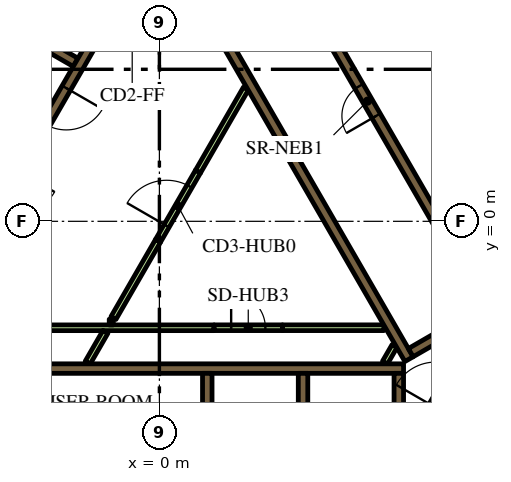
"""IFC4 building model, lengths in metres.
Left out: names, types, materials, properties, quantities, classifications, styles, units other than length and angle.
Written with IfcOpenShell. Run it as: python <this file> out.ifc"""

import sys

from ifc_helpers import new_model, si_unit, direction, frame, frame_2d, origin, place, context, subcontext, project, spatial, polyline, rectangle, outline, extrude, element, fill, save


model = new_model("IFC4")
c1 = context("Model", 3, precision=1e-05, world=origin(), true_north=direction((0.0, 1.0)))
c2 = subcontext(c1, "Body", "Model", "MODEL_VIEW")
j1 = project(units=[si_unit("LENGTHUNIT", "METRE"), si_unit("PLANEANGLEUNIT", "RADIAN")], contexts=[c1])
p1 = place(None, origin())
s1 = spatial("IfcSite", under=j1, at=p1, CompositionType="ELEMENT")
p2 = place(p1, origin())
s2 = spatial("IfcBuilding", under=s1, at=p2, CompositionType="ELEMENT")
p3 = place(p2, frame((0.0, 0.0, 62.7)))
s3 = spatial("IfcBuildingStorey", under=s2, at=p3, CompositionType="ELEMENT", Elevation=62.7)
p4 = place(p3, frame((6.776, 13.364, 0.0), z_axis=(0.0, 0.0, 1.0), x_axis=(0.500004177138, -0.8660229921, 0.0)))
e1 = element("IfcWall", 1, at=p4, inside=s3, PredefinedType="SOLIDWALL", context=c2, shape_type="SweptSolid", body=[
    extrude(rectangle(XDim=20.204, YDim=0.9, at=frame_2d((10.102, 0.0))), origin(), (0.0, 0.0, 1.0), 3.9),
])
p5 = place(p3, frame((-6.19, -3.875, 0.0), z_axis=(0.0, 0.0, 1.0), x_axis=(1.0, 0.0, 0.0)))
e2 = element("IfcWall", 2, at=p5, inside=s3, PredefinedType="SOLIDWALL", context=c2, shape_type="SweptSolid", body=[
    extrude(rectangle(XDim=12.615, YDim=0.25, at=frame_2d((6.307, 0.0))), origin(), (0.0, 0.0, 1.0), 3.9),
])
p6 = place(p3, frame((6.3, -7.268, 0.0), z_axis=(0.0, 0.0, 1.0), x_axis=(0.0, 1.0, 0.0)))
e3 = element("IfcWall", 3, at=p6, inside=s3, PredefinedType="SOLIDWALL", context=c2, shape_type="SweptSolid", body=[
    extrude(rectangle(XDim=3.268, YDim=0.25, at=frame_2d((1.634, 0.0))), origin(), (0.0, 0.0, 1.0), 3.9),
])
for number, where, z_axis, x_axis in (
    (4, (3.78, -4.0, 0.0), (0.0, 0.0, 1.0), (0.0, -1.0, 0.0)),
    (5, (1.26, -4.0, 0.0), (0.0, 0.0, 1.0), (0.0, -1.0, 0.0)),
):
    element("IfcWall", number, at=place(p3, frame(where, z_axis=z_axis, x_axis=x_axis)), inside=s3, PredefinedType="SOLIDWALL", context=c2, shape_type="SweptSolid", body=[
        extrude(rectangle(XDim=2.2, YDim=0.25, at=frame_2d((1.1, 0.0))), origin(), (0.0, 0.0, 1.0), 3.9),
    ])
p7 = place(p3, origin())
e6 = element("IfcWall", 6, at=p7, inside=s3, PredefinedType="SOLIDWALL", context=c2, shape_type="SweptSolid", body=[
    extrude(outline(polyline([(0.335, 6.925), (0.335, 6.925), (0.335, 7.075), (0.335, 7.075), (0.335, 7.075), (0.245, 7.075), (0.079, 7.363), (0.035, 7.439), (0.252, 7.564), (0.377, 7.348), (6.552, -3.348), (6.677, -3.564), (6.46, -3.689), (4.897, -0.981), (0.332, 6.925), (0.335, 6.925), (0.335, 6.925)])), origin(), (0.0, 0.0, 1.0), 3.9),
])
p8 = place(p3, frame((9.352, -1.875, 0.0), z_axis=(0.0, 0.0, 1.0), x_axis=(-0.866024844342, -0.500000968981, 0.0)))
e7 = element("IfcWall", 7, at=p8, inside=s3, PredefinedType="SOLIDWALL", context=c2, shape_type="SweptSolid", body=[
    extrude(rectangle(XDim=3.162, YDim=0.25, at=frame_2d((1.581, 0.0))), origin(), (0.0, 0.0, 1.0), 3.9),
])
p9 = place(p3, frame((-8.06, -1.311, 0.0), z_axis=(0.0, 0.0, 1.0), x_axis=(0.50000273126, 0.866023826885, 0.0)))
e8 = element("IfcWall", 8, at=p9, inside=s3, PredefinedType="SOLIDWALL", context=c2, shape_type="SweptSolid", body=[
    extrude(rectangle(XDim=10.33, YDim=0.25, at=frame_2d((5.165, 0.0))), origin(), (0.0, 0.0, 1.0), 3.9),
])
p10 = place(p3, frame((-2.204, 4.182, 0.0), z_axis=(0.0, 0.0, 1.0), x_axis=(-0.866008176907, 0.50002983664, 0.0)))
e9 = element("IfcWall", 9, at=p10, inside=s3, PredefinedType="SOLIDWALL", context=c2, shape_type="SweptSolid", body=[
    extrude(rectangle(XDim=2.2, YDim=0.25, at=frame_2d((1.1, 0.0))), origin(), (0.0, 0.0, 1.0), 3.9),
])
p11 = place(p3, frame((-6.086, -2.801, 0.0), z_axis=(0.0, 0.0, 1.0), x_axis=(1.0, 0.0, 0.0)))
e10 = element("IfcWall", 10, at=p11, inside=s3, PredefinedType="PARTITIONING", context=c2, shape_type="SweptSolid", body=[
    extrude(rectangle(XDim=7.524, YDim=0.15, at=frame_2d((3.762, 0.0))), origin(), (0.0, 0.0, 1.0), 2.75),
])
p12 = place(p3, frame((-1.887, -3.718, 0.0), z_axis=(0.0, 0.0, 1.0), x_axis=(0.499842898591, 0.866116087328, 0.0)))
e11 = element("IfcWall", 11, at=p12, inside=s3, PredefinedType="PARTITIONING", context=c2, shape_type="SweptSolid", body=[
    extrude(rectangle(XDim=0.936, YDim=0.15, at=frame_2d((0.468, 0.0))), origin(), (0.0, 0.0, 1.0), 2.75),
])
p13 = place(p3, frame((-1.212, -2.651, 0.0), z_axis=(0.0, 0.0, 1.0), x_axis=(-1.0, 0.0, 0.0)))
e12 = element("IfcWall", 12, at=p13, inside=s3, PredefinedType="PARTITIONING", context=c2, shape_type="SweptSolid", body=[
    extrude(rectangle(XDim=0.108, YDim=0.15, at=frame_2d((0.054, 0.0))), origin(), (0.0, 0.0, 1.0), 2.75),
])
p14 = place(p3, frame((-1.208, -2.544, 0.0), z_axis=(0.0, 0.0, 1.0), x_axis=(0.499995339376, 0.86602809458, 0.0)))
e13 = element("IfcWall", 13, at=p14, inside=s3, PredefinedType="PARTITIONING", context=c2, shape_type="SweptSolid", body=[
    extrude(rectangle(XDim=2.349, YDim=0.15, at=frame_2d((1.175, 0.0))), origin(), (0.0, 0.0, 1.0), 2.75),
])
p15 = place(p3, frame((5.936, -3.718, 0.0), z_axis=(0.0, 0.0, 1.0), x_axis=(0.499890179513, 0.866088799389, 0.0)))
e14 = element("IfcWall", 14, at=p15, inside=s3, PredefinedType="PARTITIONING", context=c2, shape_type="SweptSolid", body=[
    extrude(rectangle(XDim=0.504, YDim=0.15, at=frame_2d((0.252, 0.0))), origin(), (0.0, 0.0, 1.0), 2.75),
])
p16 = place(p3, frame((3.238, -2.8, 0.0), z_axis=(0.0, 0.0, 1.0), x_axis=(1.0, 0.0, 0.0)))
e15 = element("IfcWall", 15, at=p16, inside=s3, PredefinedType="PARTITIONING", context=c2, shape_type="SweptSolid", body=[
    extrude(rectangle(XDim=2.672, YDim=0.15, at=frame_2d((1.336, 0.0))), origin(), (0.0, 0.0, 1.0), 2.75),
])
p17 = place(p3, frame((1.016, 1.309, 0.0), z_axis=(0.0, 0.0, 1.0), x_axis=(0.49998231768, 0.866035612436, 0.0)))
e16 = element("IfcWall", 16, at=p17, inside=s3, PredefinedType="PARTITIONING", context=c2, shape_type="SweptSolid", body=[
    extrude(rectangle(XDim=2.521, YDim=0.15, at=frame_2d((1.26, 0.0))), origin(), (0.0, 0.0, 1.0), 2.75),
])
p18 = place(p3, frame((11.553, -0.46, 0.0), z_axis=(0.0, 0.0, 1.0), x_axis=(-0.500006514828, 0.866021642414, 0.0)))
e17 = element("IfcWall", 17, at=p18, inside=s3, PredefinedType="SOLIDWALL", context=c2, shape_type="SweptSolid", body=[
    extrude(rectangle(XDim=12.35, YDim=0.25, at=frame_2d((6.175, 0.0))), origin(), (0.0, 0.0, 1.0), 3.9),
])
p19 = place(p18, frame((0.585, 0.0, 0.0)))
e18 = element("IfcOpeningElement", 18, at=p19, cuts=e17, PredefinedType="OPENING", context=c2, shape_type="SweptSolid", body=[
    extrude(rectangle(XDim=1.1, YDim=2.1, at=frame_2d((0.55, 1.05))), frame((0.0, 0.135, 0.0), z_axis=(0.0, -1.0, 0.0), x_axis=(1.0, 0.0, 0.0)), (0.0, 0.0, 1.0), 0.27),
])
p20 = place(p18, frame((3.105, 0.0, 0.0)))
e19 = element("IfcOpeningElement", 19, at=p20, cuts=e17, PredefinedType="OPENING", context=c2, shape_type="SweptSolid", body=[
    extrude(rectangle(XDim=1.1, YDim=2.1, at=frame_2d((0.55, 1.05))), frame((0.0, 0.135, 0.0), z_axis=(0.0, -1.0, 0.0), x_axis=(1.0, 0.0, 0.0)), (0.0, 0.0, 1.0), 0.27),
])
p21 = place(p18, frame((5.625, 0.0, 0.0)))
e20 = element("IfcOpeningElement", 20, at=p21, cuts=e17, PredefinedType="OPENING", context=c2, shape_type="SweptSolid", body=[
    extrude(rectangle(XDim=1.1, YDim=2.1, at=frame_2d((0.55, 1.05))), frame((0.0, 0.135, 0.0), z_axis=(0.0, -1.0, 0.0), x_axis=(1.0, 0.0, 0.0)), (0.0, 0.0, 1.0), 0.27),
])
p22 = place(p3, frame((8.565, -2.185, 0.0), z_axis=(0.0, 0.0, 1.0), x_axis=(-0.499997954832, 0.866026584559, 0.0)))
e21 = element("IfcWall", 21, at=p22, inside=s3, PredefinedType="SOLIDWALL", context=c2, shape_type="SweptSolid", body=[
    extrude(rectangle(XDim=12.35, YDim=0.25, at=frame_2d((6.175, 0.0))), origin(), (0.0, 0.0, 1.0), 3.9),
])
p23 = place(p22, frame((5.725, 0.0, 0.0)))
e22 = element("IfcOpeningElement", 22, at=p23, cuts=e21, PredefinedType="OPENING", context=c2, shape_type="SweptSolid", body=[
    extrude(rectangle(XDim=0.9, YDim=2.1, at=frame_2d((0.45, 1.05))), frame((0.0, 0.135, 0.0), z_axis=(0.0, -1.0, 0.0), x_axis=(1.0, 0.0, 0.0)), (0.0, 0.0, 1.0), 0.27),
])
p24 = place(p3, frame((-0.898, 6.194, 0.0), z_axis=(0.0, 0.0, 1.0), x_axis=(-0.499996202215, -0.866027596426, 0.0)))
e23 = element("IfcWall", 23, at=p24, inside=s3, PredefinedType="SOLIDWALL", context=c2, shape_type="SweptSolid", body=[
    extrude(rectangle(XDim=9.83, YDim=0.25, at=frame_2d((4.915, 0.0))), origin(), (0.0, 0.0, 1.0), 3.9),
])
p25 = place(p24, frame((0.585, 0.0, 0.0)))
e24 = element("IfcOpeningElement", 24, at=p25, cuts=e23, PredefinedType="OPENING", context=c2, shape_type="SweptSolid", body=[
    extrude(rectangle(XDim=1.1, YDim=2.1, at=frame_2d((0.55, 1.05))), frame((0.0, 0.135, 0.0), z_axis=(0.0, -1.0, 0.0), x_axis=(1.0, 0.0, 0.0)), (0.0, 0.0, 1.0), 0.27),
])
p26 = place(p24, frame((3.105, 0.0, 0.0)))
e25 = element("IfcOpeningElement", 25, at=p26, cuts=e23, PredefinedType="OPENING", context=c2, shape_type="SweptSolid", body=[
    extrude(rectangle(XDim=1.1, YDim=2.1, at=frame_2d((0.55, 1.05))), frame((0.0, 0.135, 0.0), z_axis=(0.0, -1.0, 0.0), x_axis=(1.0, 0.0, 0.0)), (0.0, 0.0, 1.0), 0.27),
])
p27 = place(p24, frame((5.625, 0.0, 0.0)))
e26 = element("IfcOpeningElement", 26, at=p27, cuts=e23, PredefinedType="OPENING", context=c2, shape_type="SweptSolid", body=[
    extrude(rectangle(XDim=1.1, YDim=2.1, at=frame_2d((0.55, 1.05))), frame((0.0, 0.135, 0.0), z_axis=(0.0, -1.0, 0.0), x_axis=(1.0, 0.0, 0.0)), (0.0, 0.0, 1.0), 0.27),
])
p28 = place(p24, frame((8.145, 0.0, 0.0)))
e27 = element("IfcOpeningElement", 27, at=p28, cuts=e23, PredefinedType="OPENING", context=c2, shape_type="SweptSolid", body=[
    extrude(rectangle(XDim=1.1, YDim=2.1, at=frame_2d((0.55, 1.05))), frame((0.0, 0.135, 0.0), z_axis=(0.0, -1.0, 0.0), x_axis=(1.0, 0.0, 0.0)), (0.0, 0.0, 1.0), 0.27),
])
p29 = place(p3, frame((7.048, -5.292, 0.0), z_axis=(0.0, 0.0, 1.0), x_axis=(0.49994051562, 0.866059744384, 0.0)))
e28 = element("IfcWall", 28, at=p29, inside=s3, PredefinedType="SOLIDWALL", context=c2, shape_type="SweptSolid", body=[
    extrude(rectangle(XDim=2.1, YDim=0.4, at=frame_2d((1.05, 0.0))), origin(), (0.0, 0.0, 1.0), 3.9),
])
p30 = place(p29, frame((0.45, 0.0, 0.0)))
e29 = element("IfcOpeningElement", 29, at=p30, cuts=e28, PredefinedType="OPENING", context=c2, shape_type="SweptSolid", body=[
    extrude(rectangle(XDim=1.2, YDim=2.1, at=frame_2d((0.6, 1.05))), frame((0.0, 0.21, 0.0), z_axis=(0.0, -1.0, 0.0), x_axis=(1.0, 0.0, 0.0)), (0.0, 0.0, 1.0), 0.42),
])
p31 = place(p3, frame((-0.034, -0.509, 0.0), z_axis=(0.0, 0.0, 1.0), x_axis=(0.49994051562, 0.866059744384, 0.0)))
e30 = element("IfcWall", 30, at=p31, inside=s3, PredefinedType="PARTITIONING", context=c2, shape_type="SweptSolid", body=[
    extrude(rectangle(XDim=2.1, YDim=0.15, at=frame_2d((1.05, 0.0))), origin(), (0.0, 0.0, 1.0), 2.75),
])
p32 = place(p31, frame((0.45, 0.0, 0.0)))
e31 = element("IfcOpeningElement", 31, at=p32, cuts=e30, PredefinedType="OPENING", context=c2, shape_type="SweptSolid", body=[
    extrude(rectangle(XDim=1.2, YDim=2.1, at=frame_2d((0.6, 1.05))), frame((0.0, 0.085, 0.0), z_axis=(0.0, -1.0, 0.0), x_axis=(1.0, 0.0, 0.0)), (0.0, 0.0, 1.0), 0.17),
])
p33 = place(p3, frame((1.438, -2.8, 0.0), z_axis=(0.0, 0.0, 1.0), x_axis=(1.0, 0.0, 0.0)))
e32 = element("IfcWall", 32, at=p33, inside=s3, PredefinedType="PARTITIONING", context=c2, shape_type="SweptSolid", body=[
    extrude(rectangle(XDim=1.8, YDim=0.15, at=frame_2d((0.9, 0.0))), origin(), (0.0, 0.0, 1.0), 2.75),
])
p34 = place(p33, frame((0.45, 0.0, 0.0)))
e33 = element("IfcOpeningElement", 33, at=p34, cuts=e32, PredefinedType="OPENING", context=c2, shape_type="SweptSolid", body=[
    extrude(rectangle(XDim=0.9, YDim=2.1, at=frame_2d((0.45, 1.05))), frame((0.0, 0.085, 0.0), z_axis=(0.0, -1.0, 0.0), x_axis=(1.0, 0.0, 0.0)), (0.0, 0.0, 1.0), 0.17),
])
p35 = place(p3, frame((6.163, 18.475, 0.0), z_axis=(0.0, 0.0, 1.0), x_axis=(0.500001317485, -0.866024643133, 0.0)))
e34 = element("IfcWall", 34, at=p35, inside=s3, PredefinedType="PARTITIONING", context=c2, shape_type="SweptSolid", body=[
    extrude(rectangle(XDim=25.767, YDim=0.15, at=frame_2d((12.883, 0.0))), origin(), (0.0, 0.0, 1.0), 2.75),
])
p36 = place(p35, frame((21.138, 0.0, 0.0)))
e35 = element("IfcOpeningElement", 35, at=p36, cuts=e34, PredefinedType="OPENING", context=c2, shape_type="SweptSolid", body=[
    extrude(rectangle(XDim=1.0, YDim=2.1, at=frame_2d((0.5, 1.05))), frame((0.0, 0.085, 0.0), z_axis=(0.0, -1.0, 0.0), x_axis=(1.0, 0.0, 0.0)), (0.0, 0.0, 1.0), 0.17),
])
p37 = place(p35, frame((9.948, 0.0, 0.0)))
e36 = element("IfcOpeningElement", 36, at=p37, cuts=e34, PredefinedType="OPENING", context=c2, shape_type="SweptSolid", body=[
    extrude(rectangle(XDim=1.1, YDim=2.1, at=frame_2d((0.55, 1.05))), frame((0.0, 0.085, 0.0), z_axis=(0.0, -1.0, 0.0), x_axis=(1.0, 0.0, 0.0)), (0.0, 0.0, 1.0), 0.17),
])
p38 = place(p35, frame((8.641, 0.0, 0.0)))
e37 = element("IfcOpeningElement", 37, at=p38, cuts=e34, PredefinedType="OPENING", context=c2, shape_type="SweptSolid", body=[
    extrude(rectangle(XDim=1.0, YDim=2.1, at=frame_2d((0.5, 1.05))), frame((0.0, 0.085, 0.0), z_axis=(0.0, -1.0, 0.0), x_axis=(1.0, 0.0, 0.0)), (0.0, 0.0, 1.0), 0.17),
])
p39 = place(p35, frame((0.18, 0.0, 0.0)))
e38 = element("IfcOpeningElement", 38, at=p39, cuts=e34, PredefinedType="OPENING", context=c2, shape_type="SweptSolid", body=[
    extrude(rectangle(XDim=1.0, YDim=2.1, at=frame_2d((0.5, 1.05))), frame((0.0, 0.085, 0.0), z_axis=(0.0, -1.0, 0.0), x_axis=(1.0, 0.0, 0.0)), (0.0, 0.0, 1.0), 0.17),
])
p40 = place(p23, origin())
e39 = element("IfcDoor", 39, at=p40, inside=s3, OperationType="SINGLE_SWING_LEFT", PredefinedType="DOOR", context=c2, shape_type="SweptSolid", body=[
    extrude(rectangle(XDim=0.9, YDim=2.1, at=frame_2d((0.45, 1.05))), frame((0.0, 0.025, 0.0), z_axis=(0.0, -1.0, 0.0), x_axis=(1.0, 0.0, 0.0)), (0.0, 0.0, 1.0), 0.05),
])
fill(e22, e39)
p41 = place(p26, origin())
e40 = element("IfcDoor", 40, at=p41, inside=s3, OperationType="DOUBLE_DOOR_SLIDING", PredefinedType="DOOR", context=c2, shape_type="SweptSolid", body=[
    extrude(rectangle(XDim=1.1, YDim=2.1, at=frame_2d((0.55, 1.05))), frame((0.0, 0.025, 0.0), z_axis=(0.0, -1.0, 0.0), x_axis=(1.0, 0.0, 0.0)), (0.0, 0.0, 1.0), 0.05),
])
fill(e25, e40)
p42 = place(p32, origin())
e41 = element("IfcDoor", 41, at=p42, inside=s3, OperationType="SINGLE_SWING_LEFT", PredefinedType="DOOR", context=c2, shape_type="SweptSolid", body=[
    extrude(rectangle(XDim=1.2, YDim=2.1, at=frame_2d((0.6, 1.05))), frame((0.0, 0.025, 0.0), z_axis=(0.0, -1.0, 0.0), x_axis=(1.0, 0.0, 0.0)), (0.0, 0.0, 1.0), 0.05),
])
fill(e31, e41)
p43 = place(p34, origin())
e42 = element("IfcDoor", 42, at=p43, inside=s3, OperationType="SINGLE_SWING_LEFT", PredefinedType="DOOR", context=c2, shape_type="SweptSolid", body=[
    extrude(rectangle(XDim=0.9, YDim=2.1, at=frame_2d((0.45, 1.05))), frame((0.0, 0.025, 0.0), z_axis=(0.0, -1.0, 0.0), x_axis=(1.0, 0.0, 0.0)), (0.0, 0.0, 1.0), 0.05),
])
fill(e33, e42)
save(model, sys.argv[1])
